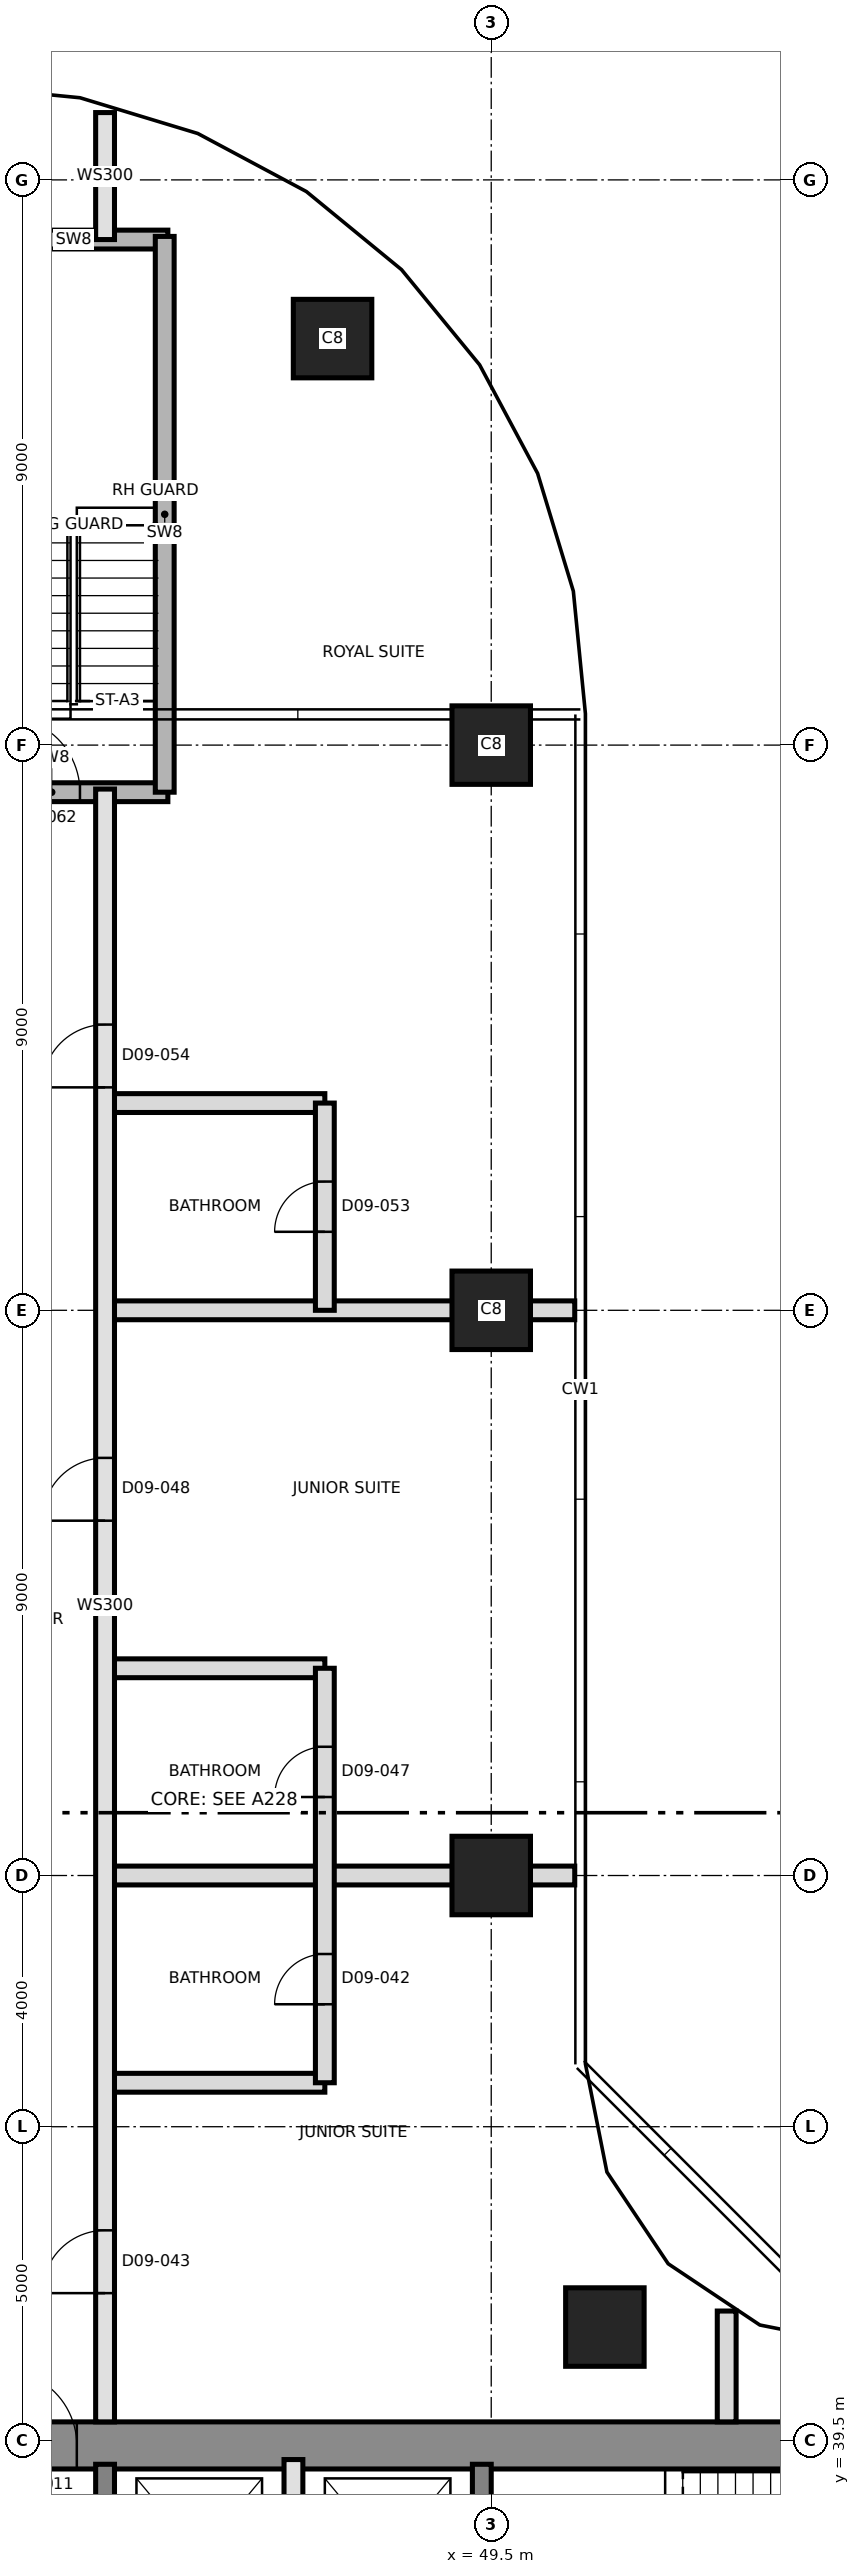
"""IFC4 building model, lengths in metres.
Left out: names, types, materials, properties, quantities, classifications, styles, units other than length and angle.
Written with IfcOpenShell. Run it as: python <this file> out.ifc"""

import sys

from ifc_helpers import new_model, si_unit, direction, frame, frame_2d, origin, origin_2d, place, context, subcontext, project, spatial, rectangle, extrude, element, fill, save


model = new_model("IFC4")
c1 = context("Model", 3, precision=1e-05, world=origin(), true_north=direction((0.0, 1.0)))
c2 = subcontext(c1, "Body", "Model", "MODEL_VIEW")
j1 = project(units=[si_unit("LENGTHUNIT", "METRE"), si_unit("PLANEANGLEUNIT", "RADIAN")], contexts=[c1])
p1 = place(None, origin())
s1 = spatial("IfcSite", under=j1, at=p1, CompositionType="ELEMENT")
p2 = place(p1, origin())
s2 = spatial("IfcBuilding", under=s1, at=p2, CompositionType="ELEMENT")
p3 = place(p2, frame((0.0, 0.0, 105.6)))
s3 = spatial("IfcBuildingStorey", under=s2, at=p3, CompositionType="ELEMENT", Elevation=105.6)
p4 = place(p3, frame((31.125, 39.425, 0.0), z_axis=(0.0, 0.0, 1.0), x_axis=(1.0, 0.0, 0.0)))
e1 = element("IfcWall", 1, at=p4, inside=s3, PredefinedType="SHEAR", context=c2, shape_type="SweptSolid", body=[
    extrude(rectangle(XDim=27.0, YDim=0.75, at=frame_2d((13.5, 0.0))), origin(), (0.0, 0.0, 1.0), 3.7),
])
p5 = place(p4, frame((10.575, 0.0, 0.0)))
e2 = element("IfcOpeningElement", 2, at=p5, cuts=e1, PredefinedType="OPENING", context=c2, shape_type="SweptSolid", body=[
    extrude(rectangle(XDim=1.2, YDim=2.1, at=frame_2d((0.6, 1.05))), frame((0.0, 0.385, 0.0), z_axis=(0.0, -1.0, 0.0), x_axis=(1.0, 0.0, 0.0)), (0.0, 0.0, 1.0), 0.77),
])
for number, where, z_axis, x_axis in (
    (3, (43.35, 33.5, 0.0), (0.0, 0.0, 1.0), (0.0, 1.0, 0.0)),
    (4, (49.35, 33.5, 0.0), (0.0, 0.0, 1.0), (0.0, 1.0, 0.0)),
):
    element("IfcWall", number, at=place(p3, frame(where, z_axis=z_axis, x_axis=x_axis)), inside=s3, PredefinedType="SHEAR", context=c2, shape_type="SweptSolid", body=[
        extrude(rectangle(XDim=5.625, YDim=0.3, at=frame_2d((2.812, 0.0))), origin(), (0.0, 0.0, 1.0), 3.7),
    ])
for number, where, z_axis, x_axis in (
    (5, (51.31, 41.31, 0.0), (0.0, 0.0, 1.0), (1.0, 0.0, 0.0)),
    (6, (49.5, 48.5, 0.0), (0.0, 0.0, 1.0), (1.0, 0.0, 0.0)),
    (7, (49.5, 57.5, 0.0), (0.0, 0.0, 1.0), (1.0, 0.0, 0.0)),
    (8, (49.5, 66.5, 0.0), (0.0, 0.0, 1.0), (1.0, 0.0, 0.0)),
    (9, (46.973, 72.973, 0.0), (0.0, 0.0, 1.0), (1.0, 0.0, 0.0)),
):
    element("IfcColumn", number, at=place(p3, frame(where, z_axis=z_axis, x_axis=x_axis)), inside=s3, PredefinedType="COLUMN", context=c2, shape_type="SweptSolid", body=[
        extrude(rectangle(XDim=1.25, YDim=1.25, at=origin_2d()), origin(), (0.0, 0.0, 1.0), 3.7),
    ])
p6 = place(p3, frame((46.35, 36.2, 0.0), z_axis=(0.0, 0.0, 1.0), x_axis=(0.0, 1.0, 0.0)))
e10 = element("IfcWall", 10, at=p6, inside=s3, PredefinedType="SOLIDWALL", context=c2, shape_type="SweptSolid", body=[
    extrude(rectangle(XDim=3.0, YDim=0.3, at=frame_2d((1.5, 0.0))), origin(), (0.0, 0.0, 1.0), 3.4),
])
p7 = place(p3, frame((43.35, 45.2, 0.0), z_axis=(0.0, 0.0, 1.0), x_axis=(1.0, 0.0, 0.0)))
e11 = element("IfcWall", 11, at=p7, inside=s3, PredefinedType="PARTITIONING", context=c2, shape_type="SweptSolid", body=[
    extrude(rectangle(XDim=3.5, YDim=0.3, at=frame_2d((1.75, 0.0))), origin(), (0.0, 0.0, 1.0), 3.4),
])
p8 = place(p3, frame((43.35, 48.5, 0.0), z_axis=(0.0, 0.0, 1.0), x_axis=(1.0, 0.0, 0.0)))
e12 = element("IfcWall", 12, at=p8, inside=s3, PredefinedType="PARTITIONING", context=c2, shape_type="SweptSolid", body=[
    extrude(rectangle(XDim=7.48, YDim=0.3, at=frame_2d((3.74, 0.0))), origin(), (0.0, 0.0, 1.0), 3.4),
])
p9 = place(p3, frame((43.35, 51.8, 0.0), z_axis=(0.0, 0.0, 1.0), x_axis=(1.0, 0.0, 0.0)))
e13 = element("IfcWall", 13, at=p9, inside=s3, PredefinedType="PARTITIONING", context=c2, shape_type="SweptSolid", body=[
    extrude(rectangle(XDim=3.5, YDim=0.3, at=frame_2d((1.75, 0.0))), origin(), (0.0, 0.0, 1.0), 3.4),
])
p10 = place(p3, frame((43.35, 57.5, 0.0), z_axis=(0.0, 0.0, 1.0), x_axis=(1.0, 0.0, 0.0)))
e14 = element("IfcWall", 14, at=p10, inside=s3, PredefinedType="PARTITIONING", context=c2, shape_type="SweptSolid", body=[
    extrude(rectangle(XDim=7.48, YDim=0.3, at=frame_2d((3.74, 0.0))), origin(), (0.0, 0.0, 1.0), 3.4),
])
p11 = place(p3, frame((43.35, 60.8, 0.0), z_axis=(0.0, 0.0, 1.0), x_axis=(1.0, 0.0, 0.0)))
e15 = element("IfcWall", 15, at=p11, inside=s3, PredefinedType="PARTITIONING", context=c2, shape_type="SweptSolid", body=[
    extrude(rectangle(XDim=3.5, YDim=0.3, at=frame_2d((1.75, 0.0))), origin(), (0.0, 0.0, 1.0), 3.4),
])
p12 = place(p3, frame((40.65, 65.75, 0.0), z_axis=(0.0, 0.0, 1.0), x_axis=(1.0, 0.0, 0.0)))
e16 = element("IfcWall", 16, at=p12, inside=s3, PredefinedType="SHEAR", context=c2, shape_type="SweptSolid", body=[
    extrude(rectangle(XDim=3.7, YDim=0.3, at=frame_2d((1.85, 0.0))), origin(), (0.0, 0.0, 1.0), 3.4),
])
p13 = place(p12, frame((1.1, 0.0, 0.0)))
e17 = element("IfcOpeningElement", 17, at=p13, cuts=e16, PredefinedType="OPENING", context=c2, shape_type="SweptSolid", body=[
    extrude(rectangle(XDim=1.2, YDim=2.1, at=frame_2d((0.6, 1.05))), frame((0.0, 0.16, 0.0), z_axis=(0.0, -1.0, 0.0), x_axis=(1.0, 0.0, 0.0)), (0.0, 0.0, 1.0), 0.32),
])
p14 = place(p3, frame((41.35, 74.55, 0.0), z_axis=(0.0, 0.0, 1.0), x_axis=(1.0, 0.0, 0.0)))
e18 = element("IfcWall", 18, at=p14, inside=s3, PredefinedType="SHEAR", context=c2, shape_type="SweptSolid", body=[
    extrude(rectangle(XDim=3.0, YDim=0.3, at=frame_2d((1.5, 0.0))), origin(), (0.0, 0.0, 1.0), 3.4),
])
p15 = place(p3, frame((43.35, 39.8, 0.0), z_axis=(0.0, 0.0, 1.0), x_axis=(0.0, 1.0, 0.0)))
e19 = element("IfcWall", 19, at=p15, inside=s3, PredefinedType="SOLIDWALL", context=c2, shape_type="SweptSolid", body=[
    extrude(rectangle(XDim=26.0, YDim=0.3, at=frame_2d((13.0, 0.0))), origin(), (0.0, 0.0, 1.0), 3.4),
])
p16 = place(p15, frame((2.05, 0.0, 0.0)))
e20 = element("IfcOpeningElement", 20, at=p16, cuts=e19, PredefinedType="OPENING", context=c2, shape_type="SweptSolid", body=[
    extrude(rectangle(XDim=1.0, YDim=2.4, at=frame_2d((0.5, 1.2))), frame((0.0, 0.16, 0.0), z_axis=(0.0, -1.0, 0.0), x_axis=(1.0, 0.0, 0.0)), (0.0, 0.0, 1.0), 0.32),
])
p17 = place(p15, frame((14.35, 0.0, 0.0)))
e21 = element("IfcOpeningElement", 21, at=p17, cuts=e19, PredefinedType="OPENING", context=c2, shape_type="SweptSolid", body=[
    extrude(rectangle(XDim=1.0, YDim=2.4, at=frame_2d((0.5, 1.2))), frame((0.0, 0.16, 0.0), z_axis=(0.0, -1.0, 0.0), x_axis=(1.0, 0.0, 0.0)), (0.0, 0.0, 1.0), 0.32),
])
p18 = place(p15, frame((21.25, 0.0, 0.0)))
e22 = element("IfcOpeningElement", 22, at=p18, cuts=e19, PredefinedType="OPENING", context=c2, shape_type="SweptSolid", body=[
    extrude(rectangle(XDim=1.0, YDim=2.4, at=frame_2d((0.5, 1.2))), frame((0.0, 0.16, 0.0), z_axis=(0.0, -1.0, 0.0), x_axis=(1.0, 0.0, 0.0)), (0.0, 0.0, 1.0), 0.32),
])
p19 = place(p3, frame((43.35, 74.55, 0.0), z_axis=(0.0, 0.0, 1.0), x_axis=(0.0, 1.0, 0.0)))
e23 = element("IfcWall", 23, at=p19, inside=s3, PredefinedType="SOLIDWALL", context=c2, shape_type="SweptSolid", body=[
    extrude(rectangle(XDim=2.022, YDim=0.3, at=frame_2d((1.011, 0.0))), origin(), (0.0, 0.0, 1.0), 3.4),
])
p20 = place(p3, frame((44.3, 65.75, 0.0), z_axis=(0.0, 0.0, 1.0), x_axis=(0.0, 1.0, 0.0)))
e24 = element("IfcWall", 24, at=p20, inside=s3, PredefinedType="SHEAR", context=c2, shape_type="SweptSolid", body=[
    extrude(rectangle(XDim=8.85, YDim=0.3, at=frame_2d((4.425, 0.0))), origin(), (0.0, 0.0, 1.0), 3.4),
])
p21 = place(p3, frame((46.85, 45.2, 0.0), z_axis=(0.0, 0.0, 1.0), x_axis=(0.0, 1.0, 0.0)))
e25 = element("IfcWall", 25, at=p21, inside=s3, PredefinedType="PARTITIONING", context=c2, shape_type="SweptSolid", body=[
    extrude(rectangle(XDim=6.6, YDim=0.3, at=frame_2d((3.3, 0.0))), origin(), (0.0, 0.0, 1.0), 3.4),
])
p22 = place(p21, frame((1.25, 0.0, 0.0)))
e26 = element("IfcOpeningElement", 26, at=p22, cuts=e25, PredefinedType="OPENING", context=c2, shape_type="SweptSolid", body=[
    extrude(rectangle(XDim=0.8, YDim=2.1, at=frame_2d((0.4, 1.05))), frame((0.0, 0.16, 0.0), z_axis=(0.0, -1.0, 0.0), x_axis=(1.0, 0.0, 0.0)), (0.0, 0.0, 1.0), 0.32),
])
p23 = place(p21, frame((4.55, 0.0, 0.0)))
e27 = element("IfcOpeningElement", 27, at=p23, cuts=e25, PredefinedType="OPENING", context=c2, shape_type="SweptSolid", body=[
    extrude(rectangle(XDim=0.8, YDim=2.1, at=frame_2d((0.4, 1.05))), frame((0.0, 0.16, 0.0), z_axis=(0.0, -1.0, 0.0), x_axis=(1.0, 0.0, 0.0)), (0.0, 0.0, 1.0), 0.32),
])
p24 = place(p3, frame((46.85, 57.5, 0.0), z_axis=(0.0, 0.0, 1.0), x_axis=(0.0, 1.0, 0.0)))
e28 = element("IfcWall", 28, at=p24, inside=s3, PredefinedType="PARTITIONING", context=c2, shape_type="SweptSolid", body=[
    extrude(rectangle(XDim=3.3, YDim=0.3, at=frame_2d((1.65, 0.0))), origin(), (0.0, 0.0, 1.0), 3.4),
])
p25 = place(p24, frame((1.25, 0.0, 0.0)))
e29 = element("IfcOpeningElement", 29, at=p25, cuts=e28, PredefinedType="OPENING", context=c2, shape_type="SweptSolid", body=[
    extrude(rectangle(XDim=0.8, YDim=2.1, at=frame_2d((0.4, 1.05))), frame((0.0, 0.16, 0.0), z_axis=(0.0, -1.0, 0.0), x_axis=(1.0, 0.0, 0.0)), (0.0, 0.0, 1.0), 0.32),
])
p26 = place(p3, frame((53.25, 39.8, 0.0), z_axis=(0.0, 0.0, 1.0), x_axis=(0.0, 1.0, 0.0)))
e30 = element("IfcWall", 30, at=p26, inside=s3, PredefinedType="PARTITIONING", context=c2, shape_type="SweptSolid", body=[
    extrude(rectangle(XDim=1.765, YDim=0.3, at=frame_2d((0.882, 0.0))), origin(), (0.0, 0.0, 1.0), 3.4),
])
p27 = place(p5, origin())
e31 = element("IfcDoor", 31, at=p27, inside=s3, OperationType="SINGLE_SWING_RIGHT", PredefinedType="DOOR", context=c2, shape_type="SweptSolid", body=[
    extrude(rectangle(XDim=1.2, YDim=2.1, at=frame_2d((0.6, 1.05))), frame((0.0, 0.025, 0.0), z_axis=(0.0, -1.0, 0.0), x_axis=(1.0, 0.0, 0.0)), (0.0, 0.0, 1.0), 0.05),
])
fill(e2, e31)
p28 = place(p22, origin())
e32 = element("IfcDoor", 32, at=p28, inside=s3, OperationType="SINGLE_SWING_LEFT", PredefinedType="DOOR", context=c2, shape_type="SweptSolid", body=[
    extrude(rectangle(XDim=0.8, YDim=2.1, at=frame_2d((0.4, 1.05))), frame((0.0, 0.025, 0.0), z_axis=(0.0, -1.0, 0.0), x_axis=(1.0, 0.0, 0.0)), (0.0, 0.0, 1.0), 0.05),
])
fill(e26, e32)
p29 = place(p16, origin())
e33 = element("IfcDoor", 33, at=p29, inside=s3, OperationType="SINGLE_SWING_LEFT", PredefinedType="DOOR", context=c2, shape_type="SweptSolid", body=[
    extrude(rectangle(XDim=1.0, YDim=2.4, at=frame_2d((0.5, 1.2))), frame((0.0, 0.025, 0.0), z_axis=(0.0, -1.0, 0.0), x_axis=(1.0, 0.0, 0.0)), (0.0, 0.0, 1.0), 0.05),
])
fill(e20, e33)
p30 = place(p23, origin())
e34 = element("IfcDoor", 34, at=p30, inside=s3, OperationType="SINGLE_SWING_LEFT", PredefinedType="DOOR", context=c2, shape_type="SweptSolid", body=[
    extrude(rectangle(XDim=0.8, YDim=2.1, at=frame_2d((0.4, 1.05))), frame((0.0, 0.025, 0.0), z_axis=(0.0, -1.0, 0.0), x_axis=(1.0, 0.0, 0.0)), (0.0, 0.0, 1.0), 0.05),
])
fill(e27, e34)
p31 = place(p17, origin())
e35 = element("IfcDoor", 35, at=p31, inside=s3, OperationType="SINGLE_SWING_RIGHT", PredefinedType="DOOR", context=c2, shape_type="SweptSolid", body=[
    extrude(rectangle(XDim=1.0, YDim=2.4, at=frame_2d((0.5, 1.2))), frame((0.0, 0.025, 0.0), z_axis=(0.0, -1.0, 0.0), x_axis=(1.0, 0.0, 0.0)), (0.0, 0.0, 1.0), 0.05),
])
fill(e21, e35)
p32 = place(p25, origin())
e36 = element("IfcDoor", 36, at=p32, inside=s3, OperationType="SINGLE_SWING_LEFT", PredefinedType="DOOR", context=c2, shape_type="SweptSolid", body=[
    extrude(rectangle(XDim=0.8, YDim=2.1, at=frame_2d((0.4, 1.05))), frame((0.0, 0.025, 0.0), z_axis=(0.0, -1.0, 0.0), x_axis=(1.0, 0.0, 0.0)), (0.0, 0.0, 1.0), 0.05),
])
fill(e29, e36)
p33 = place(p18, origin())
e37 = element("IfcDoor", 37, at=p33, inside=s3, OperationType="SINGLE_SWING_RIGHT", PredefinedType="DOOR", context=c2, shape_type="SweptSolid", body=[
    extrude(rectangle(XDim=1.0, YDim=2.4, at=frame_2d((0.5, 1.2))), frame((0.0, 0.025, 0.0), z_axis=(0.0, -1.0, 0.0), x_axis=(1.0, 0.0, 0.0)), (0.0, 0.0, 1.0), 0.05),
])
fill(e22, e37)
p34 = place(p13, origin())
e38 = element("IfcDoor", 38, at=p34, inside=s3, OperationType="SINGLE_SWING_RIGHT", PredefinedType="DOOR", context=c2, shape_type="SweptSolid", body=[
    extrude(rectangle(XDim=1.2, YDim=2.1, at=frame_2d((0.6, 1.05))), frame((0.0, 0.025, 0.0), z_axis=(0.0, -1.0, 0.0), x_axis=(1.0, 0.0, 0.0)), (0.0, 0.0, 1.0), 0.05),
])
fill(e17, e38)
save(model, sys.argv[1])
